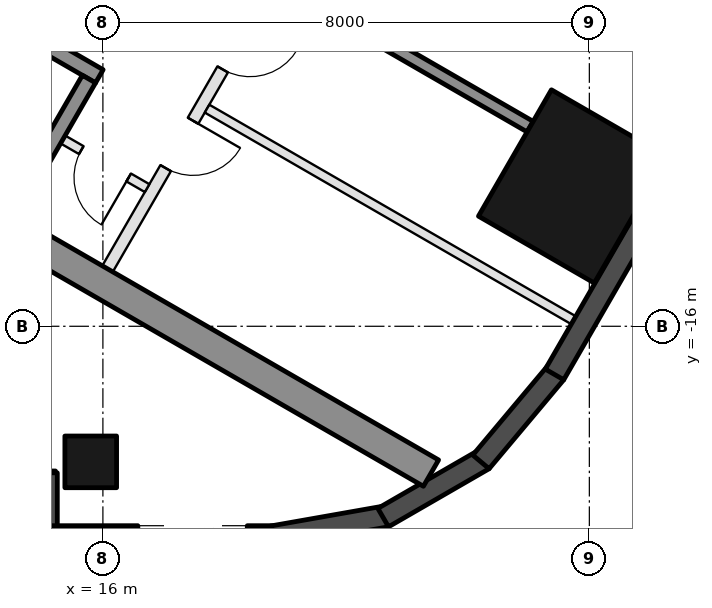
"""IFC4 building model, lengths in metres.
Left out: names, types, materials, properties, quantities, classifications, styles, units other than length and angle.
Written with IfcOpenShell. Run it as: python <this file> out.ifc"""

import sys

from ifc_helpers import new_model, si_unit, direction, frame, frame_2d, origin, origin_2d, place, context, subcontext, project, spatial, rectangle, hollow_rectangle, extrude, element, fill, save


model = new_model("IFC4")
c1 = context("Model", 3, precision=1e-05, world=origin(), true_north=direction((0.0, 1.0)))
c2 = subcontext(c1, "Body", "Model", "MODEL_VIEW")
j1 = project(units=[si_unit("LENGTHUNIT", "METRE"), si_unit("PLANEANGLEUNIT", "RADIAN")], contexts=[c1])
p1 = place(None, origin())
s1 = spatial("IfcSite", under=j1, at=p1, CompositionType="ELEMENT")
p2 = place(p1, origin())
s2 = spatial("IfcBuilding", under=s1, at=p2, CompositionType="ELEMENT")
p3 = place(p2, frame((0.0, 0.0, 172.5)))
s3 = spatial("IfcBuildingStorey", under=s2, at=p3, CompositionType="ELEMENT", Elevation=172.5)
p4 = place(p3, frame((15.8, -18.23, 0.0), z_axis=(0.0, 0.0, 1.0), x_axis=(-1.0, 0.0, 0.0)))
e1 = element("IfcColumn", 1, at=p4, inside=s3, PredefinedType="COLUMN", context=c2, shape_type="SweptSolid", body=[
    extrude(hollow_rectangle(XDim=0.85, YDim=0.85, WallThickness=0.04, at=origin_2d()), origin(), (0.0, 0.0, 1.0), 3.7),
])
p5 = place(p3, frame((23.729, -13.7, 0.0), z_axis=(0.0, 0.0, 1.0), x_axis=(0.5, 0.866025403784, 0.0)))
e2 = element("IfcColumn", 2, at=p5, inside=s3, PredefinedType="COLUMN", context=c2, shape_type="SweptSolid", body=[
    extrude(hollow_rectangle(XDim=2.4, YDim=2.2, WallThickness=0.06, at=origin_2d()), origin(), (0.0, 0.0, 1.0), 3.7),
])
p6 = place(p3, frame((8.48, -18.555, 0.0), z_axis=(0.0, 0.0, 1.0), x_axis=(1.0, 0.0, 0.0)))
e3 = element("IfcWall", 3, at=p6, inside=s3, PredefinedType="SOLIDWALL", context=c2, shape_type="SweptSolid", body=[
    extrude(rectangle(XDim=6.74, YDim=0.35, at=frame_2d((3.37, 0.0))), origin(), (0.0, 0.0, 1.0), 3.55),
])
p7 = place(p6, frame((3.57, 0.0, 0.0)))
e4 = element("IfcOpeningElement", 4, at=p7, cuts=e3, PredefinedType="OPENING", context=c2, shape_type="SweptSolid", body=[
    extrude(rectangle(XDim=2.4, YDim=2.4, at=frame_2d((1.2, 1.2))), frame((0.0, 0.185, 0.0), z_axis=(0.0, -1.0, 0.0), x_axis=(1.0, 0.0, 0.0)), (0.0, 0.0, 1.0), 0.37),
])
p8 = place(p6, frame((0.32, 0.0, 0.3)))
e5 = element("IfcOpeningElement", 5, at=p8, cuts=e3, PredefinedType="OPENING", context=c2, shape_type="SweptSolid", body=[
    extrude(rectangle(XDim=2.9, YDim=2.65, at=frame_2d((1.45, 1.325))), frame((0.0, 0.185, 0.0), z_axis=(0.0, -1.0, 0.0), x_axis=(1.0, 0.0, 0.0)), (0.0, 0.0, 1.0), 0.37),
])
p9 = place(p3, frame((15.075, -18.41, 0.0), z_axis=(0.0, 0.0, 1.0), x_axis=(0.0, -1.0, 0.0)))
e6 = element("IfcWall", 6, at=p9, inside=s3, PredefinedType="SOLIDWALL", context=c2, shape_type="SweptSolid", body=[
    extrude(rectangle(XDim=1.22, YDim=0.35, at=frame_2d((0.61, 0.0))), origin(), (0.0, 0.0, 1.0), 3.55),
])
p10 = place(p3, frame((14.9, -19.455, 0.0), z_axis=(0.0, 0.0, 1.0), x_axis=(1.0, 0.0, 0.0)))
e7 = element("IfcWall", 7, at=p10, inside=s3, PredefinedType="SOLIDWALL", context=c2, shape_type="SweptSolid", body=[
    extrude(rectangle(XDim=3.916, YDim=0.35, at=frame_2d((1.958, 0.0))), origin(), (0.0, 0.0, 1.0), 3.55),
])
p11 = place(p10, frame((1.675, 0.0, 0.3)))
e8 = element("IfcOpeningElement", 8, at=p11, cuts=e7, PredefinedType="OPENING", context=c2, shape_type="SweptSolid", body=[
    extrude(rectangle(XDim=1.8, YDim=2.65, at=frame_2d((0.9, 1.325))), frame((0.0, 0.185, 0.0), z_axis=(0.0, -1.0, 0.0), x_axis=(1.0, 0.0, 0.0)), (0.0, 0.0, 1.0), 0.37),
])
p12 = place(p3, frame((18.785, -19.458, 0.0), z_axis=(0.0, 0.0, 1.0), x_axis=(0.984798995425, 0.173697837091, 0.0)))
e9 = element("IfcWall", 9, at=p12, inside=s3, PredefinedType="SOLIDWALL", context=c2, shape_type="SweptSolid", body=[
    extrude(rectangle(XDim=1.91, YDim=0.35, at=frame_2d((0.955, 0.0))), origin(), (0.0, 0.0, 1.0), 3.55),
])
for number, where, z_axis, x_axis in (
    (10, (20.61, -19.147, 0.0), (0.0, 0.0, 1.0), (0.866, 0.5, 0.0)),
    (11, (22.217, -18.231, 0.0), (0.0, 0.0, 1.0), (0.643, 0.766, 0.0)),
):
    element("IfcWall", number, at=place(p3, frame(where, z_axis=z_axis, x_axis=x_axis)), inside=s3, PredefinedType="SOLIDWALL", context=c2, shape_type="SweptSolid", body=[
        extrude(rectangle(XDim=1.91, YDim=0.35, at=frame_2d((0.955, 0.0))), origin(), (0.0, 0.0, 1.0), 3.55),
    ])
p13 = place(p3, frame((23.427, -16.792, 0.0), z_axis=(0.0, 0.0, 1.0), x_axis=(0.500018773155, 0.866014564827, 0.0)))
e12 = element("IfcWall", 12, at=p13, inside=s3, PredefinedType="SOLIDWALL", context=c2, shape_type="SweptSolid", body=[
    extrude(rectangle(XDim=5.658, YDim=0.35, at=frame_2d((2.829, 0.0))), origin(), (0.0, 0.0, 1.0), 3.55),
])
p14 = place(p3, frame((8.547, -10.997, 0.0), z_axis=(0.0, 0.0, 1.0), x_axis=(0.866025009528, -0.500000682871, 0.0)))
e13 = element("IfcWall", 13, at=p14, inside=s3, PredefinedType="SHEAR", context=c2, shape_type="SweptSolid", body=[
    extrude(rectangle(XDim=14.837, YDim=0.5, at=frame_2d((7.418, 0.0))), origin(), (0.0, 0.0, 1.0), 3.5),
])
p15 = place(p3, frame((10.356, -8.664, 0.0), z_axis=(0.0, 0.0, 1.0), x_axis=(0.866028629588, -0.499994412703, 0.0)))
e14 = element("IfcWall", 14, at=p15, inside=s3, PredefinedType="SHEAR", context=c2, shape_type="SweptSolid", body=[
    extrude(rectangle(XDim=6.45, YDim=0.25, at=frame_2d((3.225, 0.0))), origin(), (0.0, 0.0, 1.0), 3.5),
])
p16 = place(p15, frame((0.3, 0.0, 0.0)))
e15 = element("IfcOpeningElement", 15, at=p16, cuts=e14, PredefinedType="OPENING", context=c2, shape_type="SweptSolid", body=[
    extrude(rectangle(XDim=1.0, YDim=2.1, at=frame_2d((0.5, 1.05))), frame((0.0, 0.135, 0.0), z_axis=(0.0, -1.0, 0.0), x_axis=(1.0, 0.0, 0.0)), (0.0, 0.0, 1.0), 0.27),
])
p17 = place(p3, frame((14.496, -14.143, 0.0), z_axis=(0.0, 0.0, 1.0), x_axis=(0.500062241894, 0.865989465428, 0.0)))
e16 = element("IfcWall", 16, at=p17, inside=s3, PredefinedType="SHEAR", context=c2, shape_type="SweptSolid", body=[
    extrude(rectangle(XDim=2.55, YDim=0.25, at=frame_2d((1.275, 0.0))), origin(), (0.0, 0.0, 1.0), 3.5),
])
p18 = place(p3, frame((20.567, -11.297, 0.0), z_axis=(0.0, 0.0, 1.0), x_axis=(0.866055327414, -0.49994816717, 0.0)))
e17 = element("IfcWall", 17, at=p18, inside=s3, PredefinedType="SHEAR", context=c2, shape_type="SweptSolid", body=[
    extrude(rectangle(XDim=2.84, YDim=0.2, at=frame_2d((1.42, 0.0))), origin(), (0.0, 0.0, 1.0), 3.5),
])
p19 = place(p3, frame((16.076, -15.055, 0.0), z_axis=(0.0, 0.0, 1.0), x_axis=(0.499995103361, 0.866028230842, 0.0)))
e18 = element("IfcWall", 18, at=p19, inside=s3, PredefinedType="PARTITIONING", context=c2, shape_type="SweptSolid", body=[
    extrude(rectangle(XDim=5.4, YDim=0.2, at=frame_2d((2.7, 0.0))), origin(), (0.0, 0.0, 1.0), 3.5),
])
p20 = place(p19, frame((1.913, 0.0, 0.0)))
e19 = element("IfcOpeningElement", 19, at=p20, cuts=e18, PredefinedType="OPENING", context=c2, shape_type="SweptSolid", body=[
    extrude(rectangle(XDim=0.9, YDim=2.1, at=frame_2d((0.45, 1.05))), frame((0.0, 0.11, 0.0), z_axis=(0.0, -1.0, 0.0), x_axis=(1.0, 0.0, 0.0)), (0.0, 0.0, 1.0), 0.22),
])
p21 = place(p19, frame((3.788, 0.0, 0.0)))
e20 = element("IfcOpeningElement", 20, at=p21, cuts=e18, PredefinedType="OPENING", context=c2, shape_type="SweptSolid", body=[
    extrude(rectangle(XDim=0.9, YDim=2.1, at=frame_2d((0.45, 1.05))), frame((0.0, 0.11, 0.0), z_axis=(0.0, -1.0, 0.0), x_axis=(1.0, 0.0, 0.0)), (0.0, 0.0, 1.0), 0.22),
])
p22 = place(p3, frame((15.342, -12.928, 0.0), z_axis=(0.0, 0.0, 1.0), x_axis=(0.865989903783, -0.500061482766, 0.0)))
e21 = element("IfcWall", 21, at=p22, inside=s3, PredefinedType="PARTITIONING", context=c2, shape_type="SweptSolid", body=[
    extrude(rectangle(XDim=1.6, YDim=0.15, at=frame_2d((0.8, 0.0))), origin(), (0.0, 0.0, 1.0), 3.5),
])
p23 = place(p22, frame((0.35, 0.0, 0.0)))
e22 = element("IfcOpeningElement", 22, at=p23, cuts=e21, PredefinedType="OPENING", context=c2, shape_type="SweptSolid", body=[
    extrude(rectangle(XDim=0.9, YDim=2.1, at=frame_2d((0.45, 1.05))), frame((0.0, 0.085, 0.0), z_axis=(0.0, -1.0, 0.0), x_axis=(1.0, 0.0, 0.0)), (0.0, 0.0, 1.0), 0.17),
])
p24 = place(p3, frame((17.713, -12.42, 0.0), z_axis=(0.0, 0.0, 1.0), x_axis=(0.866016523273, -0.500015381182, 0.0)))
e23 = element("IfcWall", 23, at=p24, inside=s3, PredefinedType="PARTITIONING", context=c2, shape_type="SweptSolid", body=[
    extrude(rectangle(XDim=6.95, YDim=0.15, at=frame_2d((3.475, 0.0))), origin(), (0.0, 0.0, 1.0), 3.5),
])
p25 = place(p23, frame((0.9, 0.0, 0.0), z_axis=(0.0, 0.0, 1.0), x_axis=(-1.0, 0.0, 0.0)))
e24 = element("IfcDoor", 24, at=p25, inside=s3, OperationType="SINGLE_SWING_LEFT", PredefinedType="DOOR", context=c2, shape_type="SweptSolid", body=[
    extrude(rectangle(XDim=0.9, YDim=2.1, at=frame_2d((0.45, 1.05))), frame((0.0, 0.025, 0.0), z_axis=(0.0, -1.0, 0.0), x_axis=(1.0, 0.0, 0.0)), (0.0, 0.0, 1.0), 0.05),
])
fill(e22, e24)
p26 = place(p20, frame((0.9, 0.0, 0.0), z_axis=(0.0, 0.0, 1.0), x_axis=(-1.0, 0.0, 0.0)))
e25 = element("IfcDoor", 25, at=p26, inside=s3, OperationType="SINGLE_SWING_LEFT", PredefinedType="DOOR", context=c2, shape_type="SweptSolid", body=[
    extrude(rectangle(XDim=0.9, YDim=2.1, at=frame_2d((0.45, 1.05))), frame((0.0, 0.025, 0.0), z_axis=(0.0, -1.0, 0.0), x_axis=(1.0, 0.0, 0.0)), (0.0, 0.0, 1.0), 0.05),
])
fill(e19, e25)
p27 = place(p21, frame((0.9, 0.0, 0.0), z_axis=(0.0, 0.0, 1.0), x_axis=(-1.0, 0.0, 0.0)))
e26 = element("IfcDoor", 26, at=p27, inside=s3, OperationType="SINGLE_SWING_LEFT", PredefinedType="DOOR", context=c2, shape_type="SweptSolid", body=[
    extrude(rectangle(XDim=0.9, YDim=2.1, at=frame_2d((0.45, 1.05))), frame((0.0, 0.025, 0.0), z_axis=(0.0, -1.0, 0.0), x_axis=(1.0, 0.0, 0.0)), (0.0, 0.0, 1.0), 0.05),
])
fill(e20, e26)
save(model, sys.argv[1])
